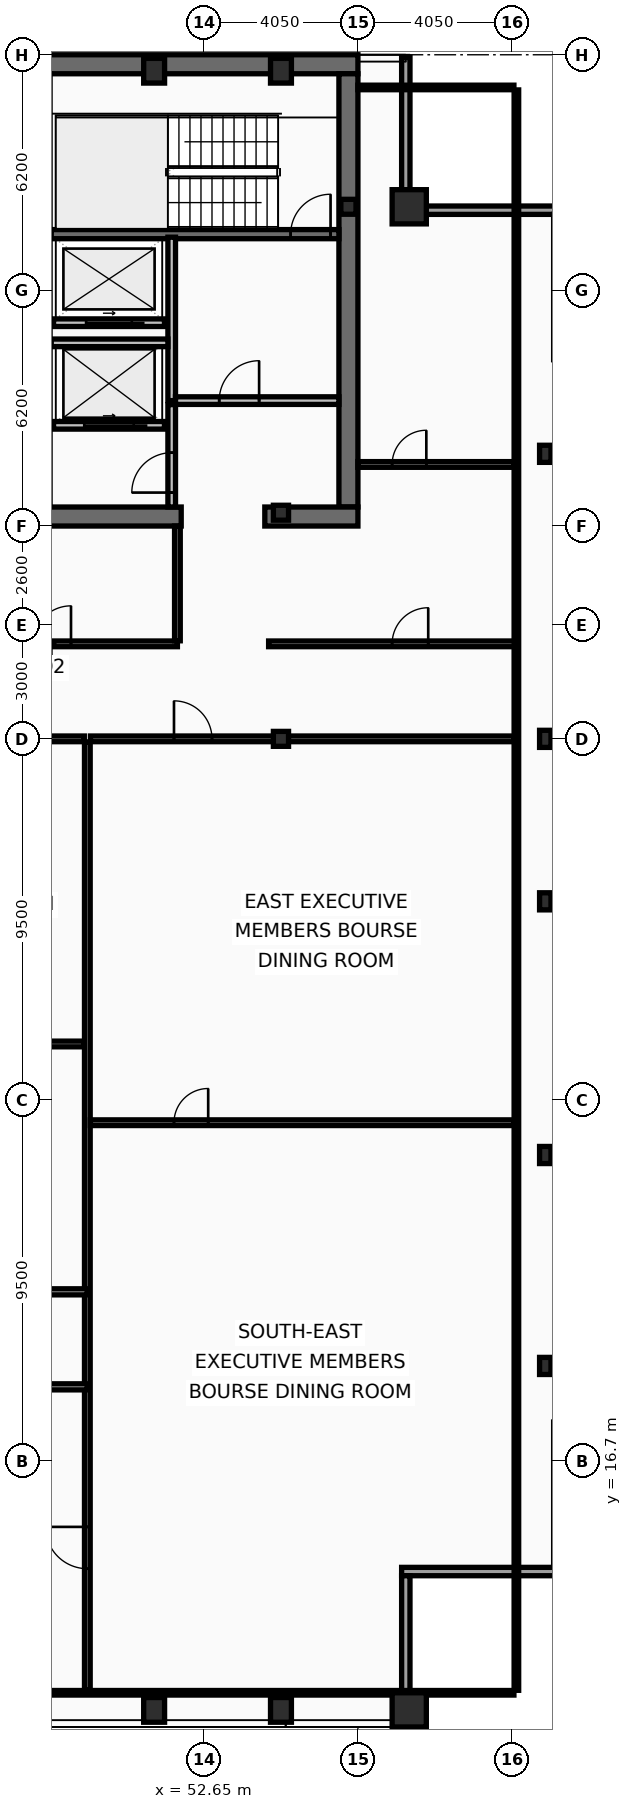
"""IFC4 building model, lengths in metres.
Left out: names, types, materials, properties, quantities, classifications, styles, units other than length and angle.
Written with IfcOpenShell. Run it as: python <this file> out.ifc"""

import sys

from ifc_helpers import new_model, si_unit, direction, frame, frame_2d, origin, origin_2d, place, context, subcontext, project, spatial, rectangle, hollow_rectangle, i_section, extrude, element, fill, save


model = new_model("IFC4")
c1 = context("Model", 3, precision=1e-05, world=origin(), true_north=direction((0.0, 1.0)))
c2 = subcontext(c1, "Body", "Model", "MODEL_VIEW")
j1 = project(units=[si_unit("LENGTHUNIT", "METRE"), si_unit("PLANEANGLEUNIT", "RADIAN")], contexts=[c1])
p1 = place(None, origin())
s1 = spatial("IfcSite", under=j1, at=p1, CompositionType="ELEMENT")
p2 = place(p1, origin())
s2 = spatial("IfcBuilding", under=s1, at=p2, CompositionType="ELEMENT")
p3 = place(p2, frame((0.0, 0.0, 295.0)))
s3 = spatial("IfcBuildingStorey", under=s2, at=p3, CompositionType="ELEMENT", Elevation=295.0)
p4 = place(p3, frame((16.2, 53.45, 0.0), z_axis=(0.0, 0.0, 1.0), x_axis=(1.0, 0.0, 0.0)))
e1 = element("IfcWall", 1, at=p4, inside=s3, PredefinedType="SHEAR", context=c2, shape_type="SweptSolid", body=[
    extrude(rectangle(XDim=40.5, YDim=0.5, at=frame_2d((20.25, 0.0))), origin(), (0.0, 0.0, 1.0), 3.44),
])
p5 = place(p3, frame((56.45, 53.2, 0.0), z_axis=(0.0, 0.0, 1.0), x_axis=(0.0, -1.0, 0.0)))
e2 = element("IfcWall", 2, at=p5, inside=s3, PredefinedType="SHEAR", context=c2, shape_type="SweptSolid", body=[
    extrude(rectangle(XDim=11.4, YDim=0.5, at=frame_2d((5.7, 0.0))), origin(), (0.0, 0.0, 1.0), 3.44),
])
p6 = place(p3, frame((52.05, 41.55, 0.0), z_axis=(0.0, 0.0, 1.0), x_axis=(-1.0, 0.0, 0.0)))
e3 = element("IfcWall", 3, at=p6, inside=s3, PredefinedType="SHEAR", context=c2, shape_type="SweptSolid", body=[
    extrude(rectangle(XDim=11.3, YDim=0.5, at=frame_2d((5.65, 0.0))), origin(), (0.0, 0.0, 1.0), 3.44),
])
p7 = place(p3, frame((56.7, 41.55, 0.0), z_axis=(0.0, 0.0, 1.0), x_axis=(-1.0, 0.0, 0.0)))
e4 = element("IfcWall", 4, at=p7, inside=s3, PredefinedType="SHEAR", context=c2, shape_type="SweptSolid", body=[
    extrude(rectangle(XDim=2.45, YDim=0.5, at=frame_2d((1.225, 0.0))), origin(), (0.0, 0.0, 1.0), 3.44),
])
p8 = place(p3, frame((48.63, 48.98, 0.0), z_axis=(0.0, 0.0, 1.0), x_axis=(1.0, 0.0, 0.0)))
e5 = element("IfcWall", 5, at=p8, inside=s3, PredefinedType="SHEAR", context=c2, shape_type="SweptSolid", body=[
    extrude(rectangle(XDim=7.57, YDim=0.24, at=frame_2d((3.785, 0.0))), origin(), (0.0, 0.0, 1.0), 3.44),
])
p9 = place(p8, frame((6.3, 0.0, 0.0)))
e6 = element("IfcOpeningElement", 6, at=p9, cuts=e5, PredefinedType="OPENING", context=c2, shape_type="SweptSolid", body=[
    extrude(rectangle(XDim=1.05, YDim=2.15, at=frame_2d((0.525, 1.075))), frame((0.0, 0.13, 0.0), z_axis=(0.0, -1.0, 0.0), x_axis=(1.0, 0.0, 0.0)), (0.0, 0.0, 1.0), 0.26),
])
for number, where, z_axis, x_axis in (
    (7, (58.05, 10.15, 0.0), (0.0, 0.0, 1.0), (1.0, 0.0, 0.0)),
    (8, (58.05, 49.7, 0.0), (0.0, 0.0, 1.0), (1.0, 0.0, 0.0)),
):
    element("IfcColumn", number, at=place(p3, frame(where, z_axis=z_axis, x_axis=x_axis)), inside=s3, PredefinedType="COLUMN", context=c2, shape_type="SweptSolid", body=[
        extrude(hollow_rectangle(XDim=0.9, YDim=0.9, WallThickness=0.05, at=origin_2d()), origin(), (0.0, 0.0, 1.0), 3.6),
    ])
for number, where, z_axis, x_axis in (
    (9, (51.337, 10.15, 0.0), (0.0, 0.0, 1.0), (1.0, 0.0, 0.0)),
    (10, (54.675, 10.15, 0.0), (0.0, 0.0, 1.0), (1.0, 0.0, 0.0)),
    (11, (51.337, 53.28, 0.0), (0.0, 0.0, 1.0), (1.0, 0.0, 0.0)),
    (12, (54.675, 53.28, 0.0), (0.0, 0.0, 1.0), (1.0, 0.0, 0.0)),
):
    element("IfcColumn", number, at=place(p3, frame(where, z_axis=z_axis, x_axis=x_axis)), inside=s3, PredefinedType="COLUMN", context=c2, shape_type="SweptSolid", body=[
        extrude(hollow_rectangle(XDim=0.55, YDim=0.65, WallThickness=0.04, at=origin_2d()), origin(), (0.0, 0.0, 1.0), 3.6),
    ])
for number, where, z_axis, x_axis in (
    (13, (61.63, 19.2, 0.0), (0.0, 0.0, 1.0), (1.0, 0.0, 0.0)),
    (14, (61.63, 24.75, 0.0), (0.0, 0.0, 1.0), (1.0, 0.0, 0.0)),
    (15, (61.63, 31.425, 0.0), (0.0, 0.0, 1.0), (1.0, 0.0, 0.0)),
    (16, (61.63, 35.7, 0.0), (0.0, 0.0, 1.0), (1.0, 0.0, 0.0)),
    (17, (61.63, 43.2, 0.0), (0.0, 0.0, 1.0), (1.0, 0.0, 0.0)),
):
    element("IfcColumn", number, at=place(p3, frame(where, z_axis=z_axis, x_axis=x_axis)), inside=s3, PredefinedType="COLUMN", context=c2, shape_type="SweptSolid", body=[
        extrude(i_section(OverallWidth=0.3, OverallDepth=0.45, WebThickness=0.014, FlangeThickness=0.026, at=origin_2d()), origin(), (0.0, 0.0, 1.0), 3.6),
    ])
for number, where, z_axis, x_axis in (
    (18, (56.45, 49.7, 0.0), (0.0, 0.0, 1.0), (1.0, 0.0, 0.0)),
    (19, (54.675, 35.7, 0.0), (0.0, 0.0, 1.0), (1.0, 0.0, 0.0)),
    (20, (54.675, 41.65, 0.0), (0.0, 0.0, 1.0), (1.0, 0.0, 0.0)),
):
    element("IfcColumn", number, at=place(p3, frame(where, z_axis=z_axis, x_axis=x_axis)), inside=s3, PredefinedType="COLUMN", context=c2, shape_type="SweptSolid", body=[
        extrude(i_section(OverallWidth=0.399, OverallDepth=0.393, WebThickness=0.023, FlangeThickness=0.037, at=origin_2d()), origin(), (0.0, 0.0, 1.0), 3.6),
    ])
p10 = place(p3, frame((57.96, 53.63, 0.0), z_axis=(0.0, 0.0, 1.0), x_axis=(0.0, -1.0, 0.0)))
e21 = element("IfcWall", 21, at=p10, inside=s3, PredefinedType="SOLIDWALL", context=c2, shape_type="SweptSolid", body=[
    extrude(rectangle(XDim=3.91, YDim=0.22, at=frame_2d((1.955, 0.0))), origin(), (0.0, 0.0, 1.0), 2.88),
])
for number, where, z_axis, x_axis in (
    (22, (57.85, 49.61, 0.0), (0.0, 0.0, 1.0), (1.0, 0.0, 0.0)),
    (23, (62.07, 13.79, 0.0), (0.0, 0.0, 1.0), (-1.0, 0.0, 0.0)),
):
    element("IfcWall", number, at=place(p3, frame(where, z_axis=z_axis, x_axis=x_axis)), inside=s3, PredefinedType="SOLIDWALL", context=c2, shape_type="SweptSolid", body=[
        extrude(rectangle(XDim=4.22, YDim=0.22, at=frame_2d((2.11, 0.0))), origin(), (0.0, 0.0, 1.0), 2.88),
    ])
p11 = place(p3, frame((57.96, 13.68, 0.0), z_axis=(0.0, 0.0, 1.0), x_axis=(0.0, -1.0, 0.0)))
e24 = element("IfcWall", 24, at=p11, inside=s3, PredefinedType="SOLIDWALL", context=c2, shape_type="SweptSolid", body=[
    extrude(rectangle(XDim=3.91, YDim=0.22, at=frame_2d((1.955, 0.0))), origin(), (0.0, 0.0, 1.0), 2.88),
])
p12 = place(p3, frame((51.61, 43.95, 0.0), z_axis=(0.0, 0.0, 1.0), x_axis=(-1.0, 0.0, 0.0)))
e25 = element("IfcWall", 25, at=p12, inside=s3, PredefinedType="PARTITIONING", context=c2, shape_type="SweptSolid", body=[
    extrude(rectangle(XDim=2.92, YDim=0.2, at=frame_2d((1.46, 0.0))), origin(), (0.0, 0.0, 1.0), 3.44),
])
p13 = place(p12, frame((0.81, 0.0, 0.0)))
e26 = element("IfcOpeningElement", 26, at=p13, cuts=e25, PredefinedType="OPENING", context=c2, shape_type="SweptSolid", body=[
    extrude(rectangle(XDim=1.3, YDim=2.18, at=frame_2d((0.65, 1.09))), frame((0.0, 0.11, 0.0), z_axis=(0.0, -1.0, 0.0), x_axis=(1.0, 0.0, 0.0)), (0.0, 0.0, 1.0), 0.22),
])
p14 = place(p3, frame((51.61, 46.65, 0.0), z_axis=(0.0, 0.0, 1.0), x_axis=(-1.0, 0.0, 0.0)))
e27 = element("IfcWall", 27, at=p14, inside=s3, PredefinedType="PARTITIONING", context=c2, shape_type="SweptSolid", body=[
    extrude(rectangle(XDim=2.92, YDim=0.2, at=frame_2d((1.46, 0.0))), origin(), (0.0, 0.0, 1.0), 3.44),
])
p15 = place(p14, frame((0.86, 0.0, 0.0)))
e28 = element("IfcOpeningElement", 28, at=p15, cuts=e27, PredefinedType="OPENING", context=c2, shape_type="SweptSolid", body=[
    extrude(rectangle(XDim=1.2, YDim=2.18, at=frame_2d((0.6, 1.09))), frame((0.0, 0.11, 0.0), z_axis=(0.0, -1.0, 0.0), x_axis=(1.0, 0.0, 0.0)), (0.0, 0.0, 1.0), 0.22),
])
p16 = place(p3, frame((51.8, 44.6, 0.0), z_axis=(0.0, 0.0, 1.0), x_axis=(0.0, 1.0, 0.0)))
e29 = element("IfcWall", 29, at=p16, inside=s3, PredefinedType="PARTITIONING", context=c2, shape_type="SweptSolid", body=[
    extrude(rectangle(XDim=4.3, YDim=0.2, at=frame_2d((2.15, 0.0))), origin(), (0.0, 0.0, 1.0), 3.44),
])
p17 = place(p3, frame((51.9, 44.6, 0.0), z_axis=(0.0, 0.0, 1.0), x_axis=(1.0, 0.0, 0.0)))
e30 = element("IfcWall", 30, at=p17, inside=s3, PredefinedType="PARTITIONING", context=c2, shape_type="SweptSolid", body=[
    extrude(rectangle(XDim=4.3, YDim=0.2, at=frame_2d((2.15, 0.0))), origin(), (0.0, 0.0, 1.0), 3.44),
])
p18 = place(p17, frame((1.15, 0.0, 0.0)))
e31 = element("IfcOpeningElement", 31, at=p18, cuts=e30, PredefinedType="OPENING", context=c2, shape_type="SweptSolid", body=[
    extrude(rectangle(XDim=1.05, YDim=2.15, at=frame_2d((0.525, 1.075))), frame((0.0, 0.11, 0.0), z_axis=(0.0, -1.0, 0.0), x_axis=(1.0, 0.0, 0.0)), (0.0, 0.0, 1.0), 0.22),
])
p19 = place(p3, frame((48.63, 46.12, 0.0), z_axis=(0.0, 0.0, 1.0), x_axis=(1.0, 0.0, 0.0)))
e32 = element("IfcWall", 32, at=p19, inside=s3, PredefinedType="PARTITIONING", context=c2, shape_type="SweptSolid", body=[
    extrude(rectangle(XDim=3.07, YDim=0.2, at=frame_2d((1.535, 0.0))), origin(), (0.0, 0.0, 1.0), 3.44),
])
p20 = place(p3, frame((51.8, 41.8, 0.0), z_axis=(0.0, 0.0, 1.0), x_axis=(0.0, 1.0, 0.0)))
e33 = element("IfcWall", 33, at=p20, inside=s3, PredefinedType="PARTITIONING", context=c2, shape_type="SweptSolid", body=[
    extrude(rectangle(XDim=2.695, YDim=0.2, at=frame_2d((1.348, 0.0))), origin(), (0.0, 0.0, 1.0), 3.44),
])
p21 = place(p20, frame((0.38, 0.0, 0.0)))
e34 = element("IfcOpeningElement", 34, at=p21, cuts=e33, PredefinedType="OPENING", context=c2, shape_type="SweptSolid", body=[
    extrude(rectangle(XDim=1.05, YDim=2.15, at=frame_2d((0.525, 1.075))), frame((0.0, 0.11, 0.0), z_axis=(0.0, -1.0, 0.0), x_axis=(1.0, 0.0, 0.0)), (0.0, 0.0, 1.0), 0.22),
])
p22 = place(p3, frame((47.05, 38.2, 0.0), z_axis=(0.0, 0.0, 1.0), x_axis=(1.0, 0.0, 0.0)))
e35 = element("IfcWall", 35, at=p22, inside=s3, PredefinedType="PARTITIONING", context=c2, shape_type="SweptSolid", body=[
    extrude(rectangle(XDim=4.9, YDim=0.15, at=frame_2d((2.45, 0.0))), origin(), (0.0, 0.0, 1.0), 2.78),
])
p23 = place(p22, frame((1.1, 0.0, 0.0)))
e36 = element("IfcOpeningElement", 36, at=p23, cuts=e35, PredefinedType="OPENING", context=c2, shape_type="SweptSolid", body=[
    extrude(rectangle(XDim=1.0, YDim=2.05, at=frame_2d((0.5, 1.025))), frame((0.0, 0.085, 0.0), z_axis=(0.0, -1.0, 0.0), x_axis=(1.0, 0.0, 0.0)), (0.0, 0.0, 1.0), 0.17),
])
p24 = place(p3, frame((51.95, 38.28, 0.0), z_axis=(0.0, 0.0, 1.0), x_axis=(0.0, 1.0, 0.0)))
e37 = element("IfcWall", 37, at=p24, inside=s3, PredefinedType="PARTITIONING", context=c2, shape_type="SweptSolid", body=[
    extrude(rectangle(XDim=3.02, YDim=0.15, at=frame_2d((1.51, 0.0))), origin(), (0.0, 0.0, 1.0), 3.44),
])
p25 = place(p3, frame((54.35, 38.2, 0.0), z_axis=(0.0, 0.0, 1.0), x_axis=(1.0, 0.0, 0.0)))
e38 = element("IfcWall", 38, at=p25, inside=s3, PredefinedType="PARTITIONING", context=c2, shape_type="SweptSolid", body=[
    extrude(rectangle(XDim=6.52, YDim=0.15, at=frame_2d((3.26, 0.0))), origin(), (0.0, 0.0, 1.0), 2.78),
])
p26 = place(p25, frame((3.25, 0.0, 0.0)))
e39 = element("IfcOpeningElement", 39, at=p26, cuts=e38, PredefinedType="OPENING", context=c2, shape_type="SweptSolid", body=[
    extrude(rectangle(XDim=0.95, YDim=2.05, at=frame_2d((0.475, 1.025))), frame((0.0, 0.085, 0.0), z_axis=(0.0, -1.0, 0.0), x_axis=(1.0, 0.0, 0.0)), (0.0, 0.0, 1.0), 0.17),
])
p27 = place(p3, frame((56.7, 42.92, 0.0), z_axis=(0.0, 0.0, 1.0), x_axis=(1.0, 0.0, 0.0)))
e40 = element("IfcWall", 40, at=p27, inside=s3, PredefinedType="PARTITIONING", context=c2, shape_type="SweptSolid", body=[
    extrude(rectangle(XDim=4.105, YDim=0.15, at=frame_2d((2.052, 0.0))), origin(), (0.0, 0.0, 1.0), 2.78),
])
p28 = place(p27, frame((0.9, 0.0, 0.0)))
e41 = element("IfcOpeningElement", 41, at=p28, cuts=e40, PredefinedType="OPENING", context=c2, shape_type="SweptSolid", body=[
    extrude(rectangle(XDim=0.9, YDim=2.05, at=frame_2d((0.45, 1.025))), frame((0.0, 0.085, 0.0), z_axis=(0.0, -1.0, 0.0), x_axis=(1.0, 0.0, 0.0)), (0.0, 0.0, 1.0), 0.17),
])
p29 = place(p3, frame((49.58, 10.665, 0.0), z_axis=(0.0, 0.0, 1.0), x_axis=(0.0, 1.0, 0.0)))
e42 = element("IfcWall", 42, at=p29, inside=s3, PredefinedType="PARTITIONING", context=c2, shape_type="SweptSolid", body=[
    extrude(rectangle(XDim=24.955, YDim=0.15, at=frame_2d((12.478, 0.0))), origin(), (0.0, 0.0, 1.0), 3.03),
])
p30 = place(p29, frame((3.2, 0.0, 0.0)))
e43 = element("IfcOpeningElement", 43, at=p30, cuts=e42, PredefinedType="OPENING", context=c2, shape_type="SweptSolid", body=[
    extrude(rectangle(XDim=1.1, YDim=2.1, at=frame_2d((0.55, 1.05))), frame((0.0, 0.085, 0.0), z_axis=(0.0, -1.0, 0.0), x_axis=(1.0, 0.0, 0.0)), (0.0, 0.0, 1.0), 0.17),
])
p31 = place(p3, frame((24.48, 35.7, 0.0), z_axis=(0.0, 0.0, 1.0), x_axis=(1.0, 0.0, 0.0)))
e44 = element("IfcWall", 44, at=p31, inside=s3, PredefinedType="PARTITIONING", context=c2, shape_type="SweptSolid", body=[
    extrude(rectangle(XDim=25.02, YDim=0.15, at=frame_2d((12.51, 0.0))), origin(), (0.0, 0.0, 1.0), 2.78),
])
p32 = place(p3, frame((49.66, 35.7, 0.0), z_axis=(0.0, 0.0, 1.0), x_axis=(1.0, 0.0, 0.0)))
e45 = element("IfcWall", 45, at=p32, inside=s3, PredefinedType="PARTITIONING", context=c2, shape_type="SweptSolid", body=[
    extrude(rectangle(XDim=11.145, YDim=0.15, at=frame_2d((5.573, 0.0))), origin(), (0.0, 0.0, 1.0), 2.78),
])
p33 = place(p32, frame((2.2, 0.0, 0.0)))
e46 = element("IfcOpeningElement", 46, at=p33, cuts=e45, PredefinedType="OPENING", context=c2, shape_type="SweptSolid", body=[
    extrude(rectangle(XDim=1.0, YDim=2.05, at=frame_2d((0.5, 1.025))), frame((0.0, 0.085, 0.0), z_axis=(0.0, -1.0, 0.0), x_axis=(1.0, 0.0, 0.0)), (0.0, 0.0, 1.0), 0.17),
])
p34 = place(p3, frame((49.66, 25.6, 0.0), z_axis=(0.0, 0.0, 1.0), x_axis=(1.0, 0.0, 0.0)))
e47 = element("IfcWall", 47, at=p34, inside=s3, PredefinedType="PARTITIONING", context=c2, shape_type="SweptSolid", body=[
    extrude(rectangle(XDim=11.145, YDim=0.15, at=frame_2d((5.573, 0.0))), origin(), (0.0, 0.0, 1.0), 2.78),
])
p35 = place(p34, frame((2.2, 0.0, 0.0)))
e48 = element("IfcOpeningElement", 48, at=p35, cuts=e47, PredefinedType="OPENING", context=c2, shape_type="SweptSolid", body=[
    extrude(rectangle(XDim=0.9, YDim=2.05, at=frame_2d((0.45, 1.025))), frame((0.0, 0.085, 0.0), z_axis=(0.0, -1.0, 0.0), x_axis=(1.0, 0.0, 0.0)), (0.0, 0.0, 1.0), 0.17),
])
p36 = place(p3, frame((42.941, 21.15, 0.0), z_axis=(0.0, 0.0, 1.0), x_axis=(1.0, 0.0, 0.0)))
e49 = element("IfcWall", 49, at=p36, inside=s3, PredefinedType="PARTITIONING", context=c2, shape_type="SweptSolid", body=[
    extrude(rectangle(XDim=6.639, YDim=0.16, at=frame_2d((3.319, 0.0))), origin(), (0.0, 0.0, 1.0), 2.78),
])
p37 = place(p36, frame((2.788, 0.0, 0.0)))
e50 = element("IfcOpeningElement", 50, at=p37, cuts=e49, PredefinedType="OPENING", context=c2, shape_type="SweptSolid", body=[
    extrude(rectangle(XDim=1.0, YDim=2.05, at=frame_2d((0.5, 1.025))), frame((0.0, 0.09, 0.0), z_axis=(0.0, -1.0, 0.0), x_axis=(1.0, 0.0, 0.0)), (0.0, 0.0, 1.0), 0.18),
])
p38 = place(p3, frame((43.021, 27.672, 0.0), z_axis=(0.0, 0.0, 1.0), x_axis=(1.0, 0.0, 0.0)))
e51 = element("IfcWall", 51, at=p38, inside=s3, PredefinedType="PARTITIONING", context=c2, shape_type="SweptSolid", body=[
    extrude(rectangle(XDim=6.479, YDim=0.15, at=frame_2d((3.24, 0.0))), origin(), (0.0, 0.0, 1.0), 2.78),
])
p39 = place(p38, frame((2.988, 0.0, 0.0)))
e52 = element("IfcOpeningElement", 52, at=p39, cuts=e51, PredefinedType="OPENING", context=c2, shape_type="SweptSolid", body=[
    extrude(rectangle(XDim=0.9, YDim=2.05, at=frame_2d((0.45, 1.025))), frame((0.0, 0.085, 0.0), z_axis=(0.0, -1.0, 0.0), x_axis=(1.0, 0.0, 0.0)), (0.0, 0.0, 1.0), 0.17),
])
p40 = place(p3, frame((40.32, 18.65, 0.0), z_axis=(0.0, 0.0, 1.0), x_axis=(1.0, 0.0, 0.0)))
e53 = element("IfcWall", 53, at=p40, inside=s3, PredefinedType="PARTITIONING", context=c2, shape_type="SweptSolid", body=[
    extrude(rectangle(XDim=9.26, YDim=0.16, at=frame_2d((4.63, 0.0))), origin(), (0.0, 0.0, 1.0), 2.78),
])
p41 = place(p40, frame((3.889, 0.0, 0.0)))
e54 = element("IfcOpeningElement", 54, at=p41, cuts=e53, PredefinedType="OPENING", context=c2, shape_type="SweptSolid", body=[
    extrude(rectangle(XDim=1.0, YDim=2.05, at=frame_2d((0.5, 1.025))), frame((0.0, 0.09, 0.0), z_axis=(0.0, -1.0, 0.0), x_axis=(1.0, 0.0, 0.0)), (0.0, 0.0, 1.0), 0.18),
])
p42 = place(p3, frame((60.87, 10.665, 0.0), z_axis=(0.0, 0.0, 1.0), x_axis=(0.0, 1.0, 0.0)))
e55 = element("IfcWall", 55, at=p42, inside=s3, PredefinedType="PARTITIONING", context=c2, shape_type="SweptSolid", body=[
    extrude(rectangle(XDim=42.11, YDim=0.12, at=frame_2d((21.055, 0.0))), origin(), (0.0, 0.0, 1.0), 2.78),
])
p43 = place(p3, frame((56.7, 52.84, 0.0), z_axis=(0.0, 0.0, 1.0), x_axis=(1.0, 0.0, 0.0)))
e56 = element("IfcWall", 56, at=p43, inside=s3, PredefinedType="PARTITIONING", context=c2, shape_type="SweptSolid", body=[
    extrude(rectangle(XDim=4.105, YDim=0.12, at=frame_2d((2.052, 0.0))), origin(), (0.0, 0.0, 1.0), 3.44),
])
p44 = place(p3, frame((12.095, 10.6, 0.0), z_axis=(0.0, 0.0, 1.0), x_axis=(1.0, 0.0, 0.0)))
e57 = element("IfcWall", 57, at=p44, inside=s3, PredefinedType="PARTITIONING", context=c2, shape_type="SweptSolid", body=[
    extrude(rectangle(XDim=48.71, YDim=0.12, at=frame_2d((24.355, 0.0))), origin(), (0.0, 0.0, 1.0), 2.78),
])
p45 = place(p9, origin())
e58 = element("IfcDoor", 58, at=p45, inside=s3, OperationType="SINGLE_SWING_RIGHT", PredefinedType="DOOR", context=c2, shape_type="SweptSolid", body=[
    extrude(rectangle(XDim=1.05, YDim=2.15, at=frame_2d((0.525, 1.075))), frame((0.0, 0.025, 0.0), z_axis=(0.0, -1.0, 0.0), x_axis=(1.0, 0.0, 0.0)), (0.0, 0.0, 1.0), 0.05),
])
fill(e6, e58)
p46 = place(p13, origin())
e59 = element("IfcDoor", 59, at=p46, inside=s3, OperationType="SLIDING_TO_LEFT", PredefinedType="DOOR", context=c2, shape_type="SweptSolid", body=[
    extrude(rectangle(XDim=1.3, YDim=2.18, at=frame_2d((0.65, 1.09))), frame((0.0, 0.025, 0.0), z_axis=(0.0, -1.0, 0.0), x_axis=(1.0, 0.0, 0.0)), (0.0, 0.0, 1.0), 0.05),
])
fill(e26, e59)
p47 = place(p15, origin())
e60 = element("IfcDoor", 60, at=p47, inside=s3, OperationType="SLIDING_TO_LEFT", PredefinedType="DOOR", context=c2, shape_type="SweptSolid", body=[
    extrude(rectangle(XDim=1.2, YDim=2.18, at=frame_2d((0.6, 1.09))), frame((0.0, 0.025, 0.0), z_axis=(0.0, -1.0, 0.0), x_axis=(1.0, 0.0, 0.0)), (0.0, 0.0, 1.0), 0.05),
])
fill(e28, e60)
p48 = place(p18, origin())
e61 = element("IfcDoor", 61, at=p48, inside=s3, OperationType="SINGLE_SWING_RIGHT", PredefinedType="DOOR", context=c2, shape_type="SweptSolid", body=[
    extrude(rectangle(XDim=1.05, YDim=2.15, at=frame_2d((0.525, 1.075))), frame((0.0, 0.025, 0.0), z_axis=(0.0, -1.0, 0.0), x_axis=(1.0, 0.0, 0.0)), (0.0, 0.0, 1.0), 0.05),
])
fill(e31, e61)
p49 = place(p21, origin())
e62 = element("IfcDoor", 62, at=p49, inside=s3, OperationType="SINGLE_SWING_LEFT", PredefinedType="DOOR", context=c2, shape_type="SweptSolid", body=[
    extrude(rectangle(XDim=1.05, YDim=2.15, at=frame_2d((0.525, 1.075))), frame((0.0, 0.025, 0.0), z_axis=(0.0, -1.0, 0.0), x_axis=(1.0, 0.0, 0.0)), (0.0, 0.0, 1.0), 0.05),
])
fill(e34, e62)
p50 = place(p23, origin())
e63 = element("IfcDoor", 63, at=p50, inside=s3, OperationType="SINGLE_SWING_RIGHT", PredefinedType="DOOR", context=c2, shape_type="SweptSolid", body=[
    extrude(rectangle(XDim=1.0, YDim=2.05, at=frame_2d((0.5, 1.025))), frame((0.0, 0.025, 0.0), z_axis=(0.0, -1.0, 0.0), x_axis=(1.0, 0.0, 0.0)), (0.0, 0.0, 1.0), 0.05),
])
fill(e36, e63)
p51 = place(p26, origin())
e64 = element("IfcDoor", 64, at=p51, inside=s3, OperationType="SINGLE_SWING_RIGHT", PredefinedType="DOOR", context=c2, shape_type="SweptSolid", body=[
    extrude(rectangle(XDim=0.95, YDim=2.05, at=frame_2d((0.475, 1.025))), frame((0.0, 0.025, 0.0), z_axis=(0.0, -1.0, 0.0), x_axis=(1.0, 0.0, 0.0)), (0.0, 0.0, 1.0), 0.05),
])
fill(e39, e64)
p52 = place(p28, origin())
e65 = element("IfcDoor", 65, at=p52, inside=s3, OperationType="SINGLE_SWING_RIGHT", PredefinedType="DOOR", context=c2, shape_type="SweptSolid", body=[
    extrude(rectangle(XDim=0.9, YDim=2.05, at=frame_2d((0.45, 1.025))), frame((0.0, 0.025, 0.0), z_axis=(0.0, -1.0, 0.0), x_axis=(1.0, 0.0, 0.0)), (0.0, 0.0, 1.0), 0.05),
])
fill(e41, e65)
p53 = place(p30, origin())
e66 = element("IfcDoor", 66, at=p53, inside=s3, OperationType="SINGLE_SWING_RIGHT", PredefinedType="DOOR", context=c2, shape_type="SweptSolid", body=[
    extrude(rectangle(XDim=1.1, YDim=2.1, at=frame_2d((0.55, 1.05))), frame((0.0, 0.025, 0.0), z_axis=(0.0, -1.0, 0.0), x_axis=(1.0, 0.0, 0.0)), (0.0, 0.0, 1.0), 0.05),
])
fill(e43, e66)
p54 = place(p33, origin())
e67 = element("IfcDoor", 67, at=p54, inside=s3, OperationType="SINGLE_SWING_LEFT", PredefinedType="DOOR", context=c2, shape_type="SweptSolid", body=[
    extrude(rectangle(XDim=1.0, YDim=2.05, at=frame_2d((0.5, 1.025))), frame((0.0, 0.025, 0.0), z_axis=(0.0, -1.0, 0.0), x_axis=(1.0, 0.0, 0.0)), (0.0, 0.0, 1.0), 0.05),
])
fill(e46, e67)
p55 = place(p35, origin())
e68 = element("IfcDoor", 68, at=p55, inside=s3, OperationType="SINGLE_SWING_RIGHT", PredefinedType="DOOR", context=c2, shape_type="SweptSolid", body=[
    extrude(rectangle(XDim=0.9, YDim=2.05, at=frame_2d((0.45, 1.025))), frame((0.0, 0.025, 0.0), z_axis=(0.0, -1.0, 0.0), x_axis=(1.0, 0.0, 0.0)), (0.0, 0.0, 1.0), 0.05),
])
fill(e48, e68)
save(model, sys.argv[1])
